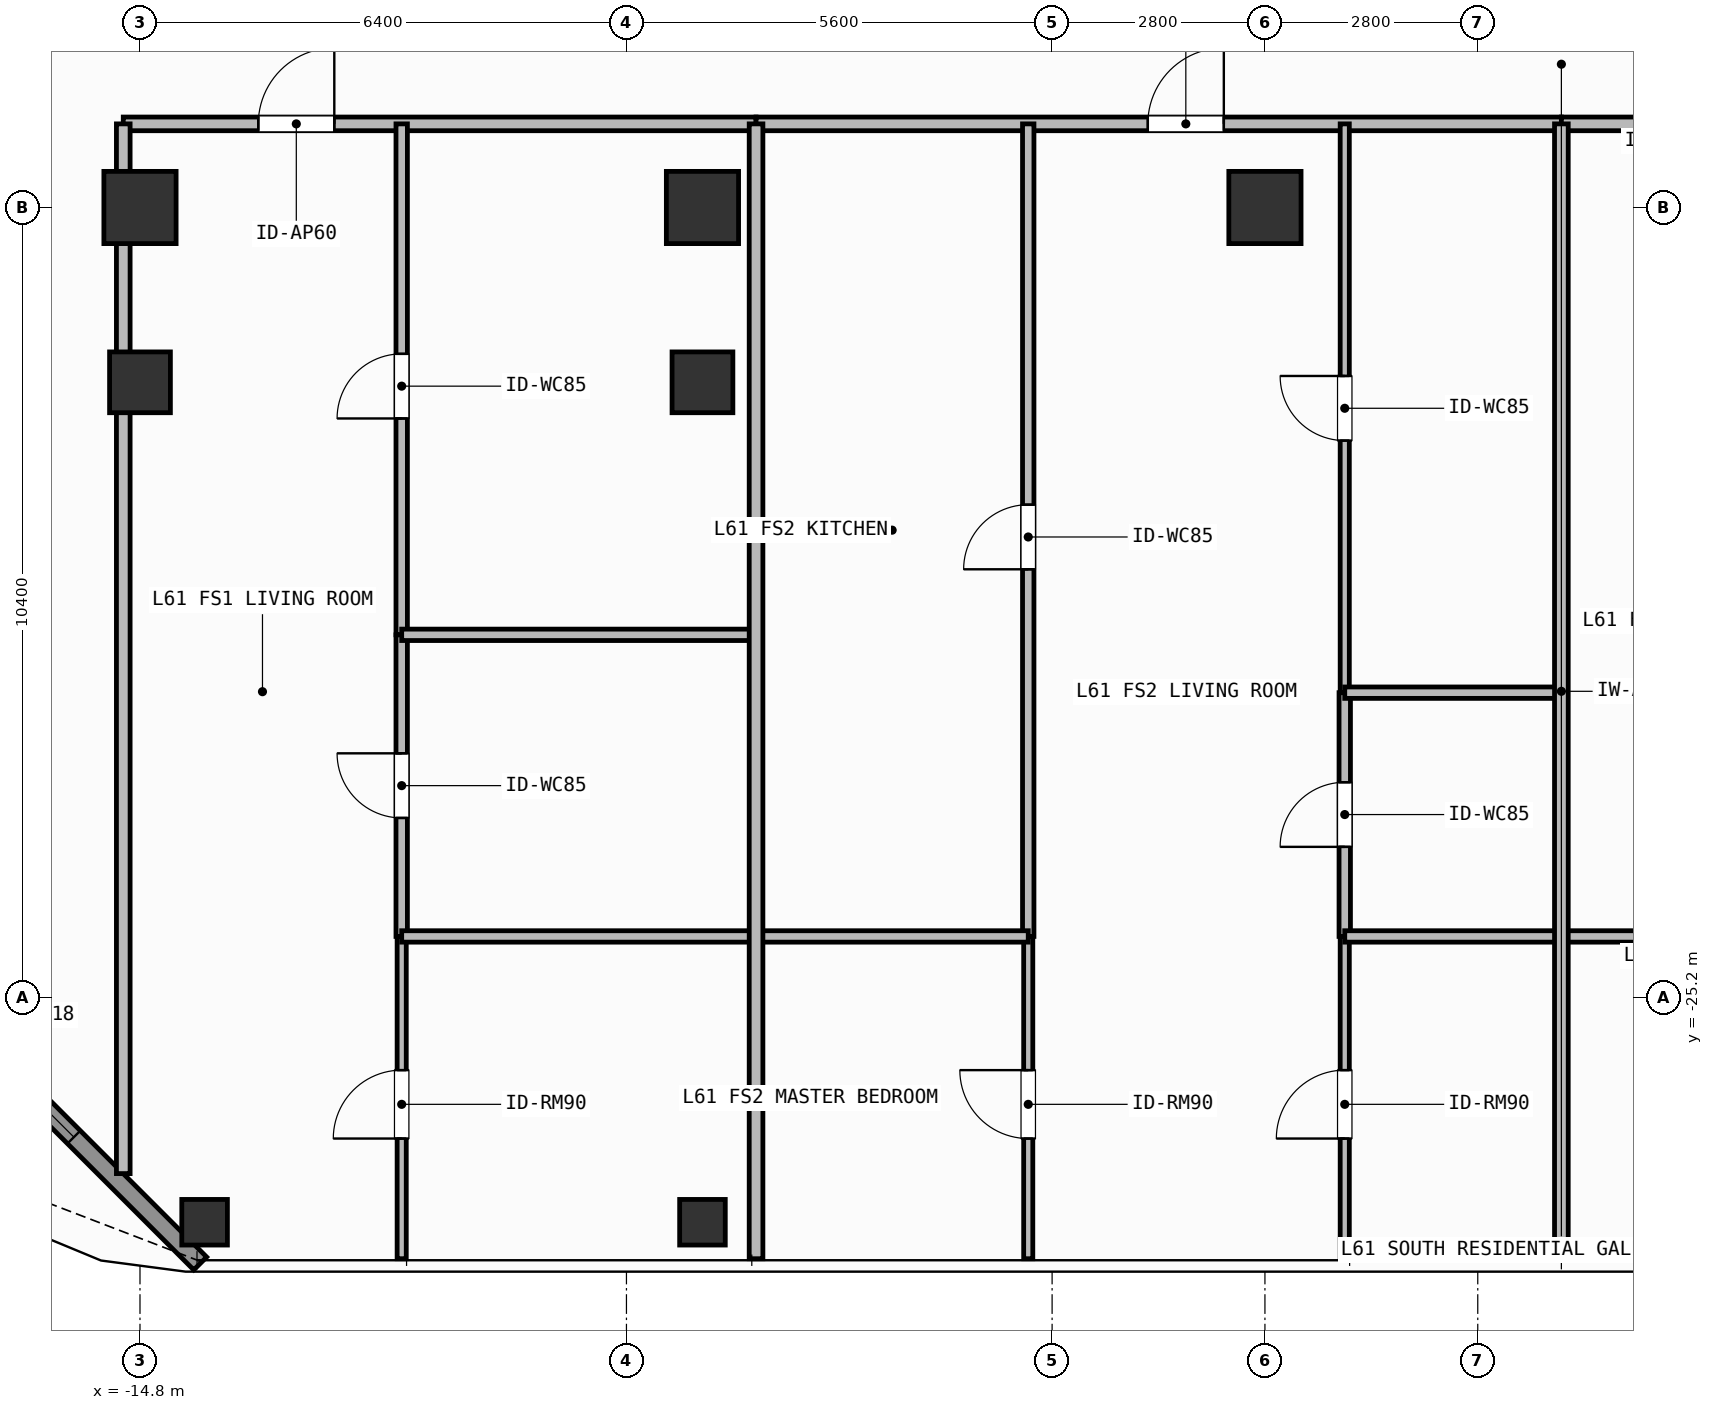
"""IFC4 building model, lengths in metres.
Left out: names, types, materials, properties, quantities, classifications, styles, units other than length and angle.
Written with IfcOpenShell. Run it as: python <this file> out.ifc"""

import sys

from ifc_helpers import new_model, si_unit, direction, frame, frame_2d, origin, origin_2d, place, context, subcontext, project, spatial, rectangle, hollow_rectangle, extrude, element, fill, save


model = new_model("IFC4")
c1 = context("Model", 3, precision=1e-05, world=origin(), true_north=direction((0.0, 1.0)))
c2 = subcontext(c1, "Body", "Model", "MODEL_VIEW")
j1 = project(units=[si_unit("LENGTHUNIT", "METRE"), si_unit("PLANEANGLEUNIT", "RADIAN")], contexts=[c1])
p1 = place(None, origin())
s1 = spatial("IfcSite", under=j1, at=p1, CompositionType="ELEMENT")
p2 = place(p1, origin())
s2 = spatial("IfcBuilding", under=s1, at=p2, CompositionType="ELEMENT")
p3 = place(p2, frame((0.0, 0.0, 250.8)))
s3 = spatial("IfcBuildingStorey", under=s2, at=p3, CompositionType="ELEMENT", Elevation=250.8)
for number, where, z_axis, x_axis in (
    (1, (-14.8, -14.8, 0.0), (0.0, 0.0, 1.0), (1.0, 0.0, 0.0)),
    (2, (-7.4, -14.8, 0.0), (0.0, 0.0, 1.0), (1.0, 0.0, 0.0)),
    (3, (0.0, -14.8, 0.0), (0.0, 0.0, 1.0), (1.0, 0.0, 0.0)),
):
    element("IfcColumn", number, at=place(p3, frame(where, z_axis=z_axis, x_axis=x_axis)), inside=s3, PredefinedType="COLUMN", context=c2, shape_type="SweptSolid", body=[
        extrude(rectangle(XDim=0.95, YDim=0.95, at=origin_2d()), origin(), (0.0, 0.0, 1.0), 3.9),
    ])
for number, where, z_axis, x_axis in (
    (4, (-14.8, -17.1, 0.0), (0.0, 0.0, 1.0), (1.0, 0.0, 0.0)),
    (5, (-7.4, -17.1, 0.0), (0.0, 0.0, 1.0), (1.0, 0.0, 0.0)),
):
    element("IfcColumn", number, at=place(p3, frame(where, z_axis=z_axis, x_axis=x_axis)), inside=s3, PredefinedType="COLUMN", context=c2, shape_type="SweptSolid", body=[
        extrude(hollow_rectangle(XDim=0.8, YDim=0.8, WallThickness=0.036, at=origin_2d()), origin(), (0.0, 0.0, 1.0), 3.9),
    ])
for number, where, z_axis, x_axis in (
    (6, (-13.95, -28.15, 0.0), (0.0, 0.0, 1.0), (1.0, 0.0, 0.0)),
    (7, (-7.4, -28.15, 0.0), (0.0, 0.0, 1.0), (1.0, 0.0, 0.0)),
):
    element("IfcColumn", number, at=place(p3, frame(where, z_axis=z_axis, x_axis=x_axis)), inside=s3, PredefinedType="COLUMN", context=c2, shape_type="SweptSolid", body=[
        extrude(hollow_rectangle(XDim=0.6, YDim=0.6, WallThickness=0.028, at=origin_2d()), origin(), (0.0, 0.0, 1.0), 3.9),
    ])
p4 = place(p3, frame((-14.008, -28.692, 0.0), z_axis=(0.0, 0.0, 1.0), x_axis=(-0.707106781187, 0.707106781187, 0.0)))
e8 = element("IfcWall", 8, at=p4, inside=s3, PredefinedType="SOLIDWALL", context=c2, shape_type="SweptSolid", body=[
    extrude(rectangle(XDim=6.201, YDim=0.24, at=frame_2d((3.101, 0.0))), origin(), (0.0, 0.0, 1.0), 3.62),
])
p5 = place(p4, frame((2.351, 0.0, 0.8)))
e9 = element("IfcOpeningElement", 9, at=p5, cuts=e8, PredefinedType="OPENING", context=c2, shape_type="SweptSolid", body=[
    extrude(rectangle(XDim=1.5, YDim=1.85, at=frame_2d((0.75, 0.925))), frame((0.0, 0.13, 0.0), z_axis=(0.0, -1.0, 0.0), x_axis=(1.0, 0.0, 0.0)), (0.0, 0.0, 1.0), 0.26),
])
p6 = place(p3, frame((-15.02, -13.7, 0.0), z_axis=(0.0, 0.0, 1.0), x_axis=(1.0, 0.0, 0.0)))
e10 = element("IfcWall", 10, at=p6, inside=s3, PredefinedType="PARTITIONING", context=c2, shape_type="SweptSolid", body=[
    extrude(rectangle(XDim=8.325, YDim=0.18, at=frame_2d((4.163, 0.0))), origin(), (0.0, 0.0, 1.0), 3.62),
])
p7 = place(p6, frame((1.777, 0.0, 0.0)))
e11 = element("IfcOpeningElement", 11, at=p7, cuts=e10, PredefinedType="OPENING", context=c2, shape_type="SweptSolid", body=[
    extrude(rectangle(XDim=1.0, YDim=2.2, at=frame_2d((0.5, 1.1))), frame((0.0, 0.1, 0.0), z_axis=(0.0, -1.0, 0.0), x_axis=(1.0, 0.0, 0.0)), (0.0, 0.0, 1.0), 0.2),
])
p8 = place(p3, frame((-11.357, -20.422, 0.0), z_axis=(0.0, 0.0, 1.0), x_axis=(0.0, 1.0, 0.0)))
e12 = element("IfcWall", 12, at=p8, inside=s3, PredefinedType="PARTITIONING", context=c2, shape_type="SweptSolid", body=[
    extrude(rectangle(XDim=6.722, YDim=0.15, at=frame_2d((3.361, 0.0))), origin(), (0.0, 0.0, 1.0), 3.62),
])
p9 = place(p8, frame((2.846, 0.0, 0.0)))
e13 = element("IfcOpeningElement", 13, at=p9, cuts=e12, PredefinedType="OPENING", context=c2, shape_type="SweptSolid", body=[
    extrude(rectangle(XDim=0.85, YDim=2.1, at=frame_2d((0.425, 1.05))), frame((0.0, 0.085, 0.0), z_axis=(0.0, -1.0, 0.0), x_axis=(1.0, 0.0, 0.0)), (0.0, 0.0, 1.0), 0.17),
])
p10 = place(p3, frame((-11.357, -24.39, 0.0), z_axis=(0.0, 0.0, 1.0), x_axis=(0.0, 1.0, 0.0)))
e14 = element("IfcWall", 14, at=p10, inside=s3, PredefinedType="PARTITIONING", context=c2, shape_type="SweptSolid", body=[
    extrude(rectangle(XDim=3.968, YDim=0.15, at=frame_2d((1.984, 0.0))), origin(), (0.0, 0.0, 1.0), 3.62),
])
p11 = place(p10, frame((1.559, 0.0, 0.0)))
e15 = element("IfcOpeningElement", 15, at=p11, cuts=e14, PredefinedType="OPENING", context=c2, shape_type="SweptSolid", body=[
    extrude(rectangle(XDim=0.85, YDim=2.1, at=frame_2d((0.425, 1.05))), frame((0.0, 0.085, 0.0), z_axis=(0.0, -1.0, 0.0), x_axis=(1.0, 0.0, 0.0)), (0.0, 0.0, 1.0), 0.17),
])
p12 = place(p3, frame((-11.357, -28.63, 0.0), z_axis=(0.0, 0.0, 1.0), x_axis=(0.0, 1.0, 0.0)))
e16 = element("IfcWall", 16, at=p12, inside=s3, PredefinedType="PARTITIONING", context=c2, shape_type="SweptSolid", body=[
    extrude(rectangle(XDim=4.24, YDim=0.12, at=frame_2d((2.12, 0.0))), origin(), (0.0, 0.0, 1.0), 3.62),
])
p13 = place(p12, frame((1.581, 0.0, 0.0)))
e17 = element("IfcOpeningElement", 17, at=p13, cuts=e16, PredefinedType="OPENING", context=c2, shape_type="SweptSolid", body=[
    extrude(rectangle(XDim=0.9, YDim=2.1, at=frame_2d((0.45, 1.05))), frame((0.0, 0.07, 0.0), z_axis=(0.0, -1.0, 0.0), x_axis=(1.0, 0.0, 0.0)), (0.0, 0.0, 1.0), 0.14),
])
p14 = place(p3, frame((-6.695, -13.7, 0.0), z_axis=(0.0, 0.0, 1.0), x_axis=(1.0, 0.0, 0.0)))
e18 = element("IfcWall", 18, at=p14, inside=s3, PredefinedType="PARTITIONING", context=c2, shape_type="SweptSolid", body=[
    extrude(rectangle(XDim=10.595, YDim=0.18, at=frame_2d((5.297, 0.0))), origin(), (0.0, 0.0, 1.0), 3.62),
])
p15 = place(p14, frame((5.154, 0.0, 0.0)))
e19 = element("IfcOpeningElement", 19, at=p15, cuts=e18, PredefinedType="OPENING", context=c2, shape_type="SweptSolid", body=[
    extrude(rectangle(XDim=1.0, YDim=2.2, at=frame_2d((0.5, 1.1))), frame((0.0, 0.1, 0.0), z_axis=(0.0, -1.0, 0.0), x_axis=(1.0, 0.0, 0.0)), (0.0, 0.0, 1.0), 0.2),
])
p16 = place(p3, frame((-3.114, -24.39, 0.0), z_axis=(0.0, 0.0, 1.0), x_axis=(0.0, 1.0, 0.0)))
e20 = element("IfcWall", 20, at=p16, inside=s3, PredefinedType="PARTITIONING", context=c2, shape_type="SweptSolid", body=[
    extrude(rectangle(XDim=10.69, YDim=0.15, at=frame_2d((5.345, 0.0))), origin(), (0.0, 0.0, 1.0), 3.62),
])
p17 = place(p16, frame((4.83, 0.0, 0.0)))
e21 = element("IfcOpeningElement", 21, at=p17, cuts=e20, PredefinedType="OPENING", context=c2, shape_type="SweptSolid", body=[
    extrude(rectangle(XDim=0.85, YDim=2.1, at=frame_2d((0.425, 1.05))), frame((0.0, 0.085, 0.0), z_axis=(0.0, -1.0, 0.0), x_axis=(1.0, 0.0, 0.0)), (0.0, 0.0, 1.0), 0.17),
])
p18 = place(p3, frame((-3.114, -28.63, 0.0), z_axis=(0.0, 0.0, 1.0), x_axis=(0.0, 1.0, 0.0)))
e22 = element("IfcWall", 22, at=p18, inside=s3, PredefinedType="PARTITIONING", context=c2, shape_type="SweptSolid", body=[
    extrude(rectangle(XDim=4.24, YDim=0.12, at=frame_2d((2.12, 0.0))), origin(), (0.0, 0.0, 1.0), 3.62),
])
p19 = place(p18, frame((1.581, 0.0, 0.0)))
e23 = element("IfcOpeningElement", 23, at=p19, cuts=e22, PredefinedType="OPENING", context=c2, shape_type="SweptSolid", body=[
    extrude(rectangle(XDim=0.9, YDim=2.1, at=frame_2d((0.45, 1.05))), frame((0.0, 0.07, 0.0), z_axis=(0.0, -1.0, 0.0), x_axis=(1.0, 0.0, 0.0)), (0.0, 0.0, 1.0), 0.14),
])
p20 = place(p3, frame((1.05, -24.39, 0.0), z_axis=(0.0, 0.0, 1.0), x_axis=(0.0, 1.0, 0.0)))
e24 = element("IfcWall", 24, at=p20, inside=s3, PredefinedType="PARTITIONING", context=c2, shape_type="SweptSolid", body=[
    extrude(rectangle(XDim=3.207, YDim=0.15, at=frame_2d((1.604, 0.0))), origin(), (0.0, 0.0, 1.0), 3.62),
])
p21 = place(p20, frame((1.178, 0.0, 0.0)))
e25 = element("IfcOpeningElement", 25, at=p21, cuts=e24, PredefinedType="OPENING", context=c2, shape_type="SweptSolid", body=[
    extrude(rectangle(XDim=0.85, YDim=2.1, at=frame_2d((0.425, 1.05))), frame((0.0, 0.085, 0.0), z_axis=(0.0, -1.0, 0.0), x_axis=(1.0, 0.0, 0.0)), (0.0, 0.0, 1.0), 0.17),
])
p22 = place(p3, frame((1.05, -21.183, 0.0), z_axis=(0.0, 0.0, 1.0), x_axis=(0.0, 1.0, 0.0)))
e26 = element("IfcWall", 26, at=p22, inside=s3, PredefinedType="PARTITIONING", context=c2, shape_type="SweptSolid", body=[
    extrude(rectangle(XDim=7.483, YDim=0.12, at=frame_2d((3.742, 0.0))), origin(), (0.0, 0.0, 1.0), 3.62),
])
p23 = place(p22, frame((3.316, 0.0, 0.0)))
e27 = element("IfcOpeningElement", 27, at=p23, cuts=e26, PredefinedType="OPENING", context=c2, shape_type="SweptSolid", body=[
    extrude(rectangle(XDim=0.85, YDim=2.1, at=frame_2d((0.425, 1.05))), frame((0.0, 0.07, 0.0), z_axis=(0.0, -1.0, 0.0), x_axis=(1.0, 0.0, 0.0)), (0.0, 0.0, 1.0), 0.14),
])
p24 = place(p3, frame((1.05, -28.63, 0.0), z_axis=(0.0, 0.0, 1.0), x_axis=(0.0, 1.0, 0.0)))
e28 = element("IfcWall", 28, at=p24, inside=s3, PredefinedType="PARTITIONING", context=c2, shape_type="SweptSolid", body=[
    extrude(rectangle(XDim=4.24, YDim=0.12, at=frame_2d((2.12, 0.0))), origin(), (0.0, 0.0, 1.0), 3.62),
])
p25 = place(p24, frame((1.581, 0.0, 0.0)))
e29 = element("IfcOpeningElement", 29, at=p25, cuts=e28, PredefinedType="OPENING", context=c2, shape_type="SweptSolid", body=[
    extrude(rectangle(XDim=0.9, YDim=2.1, at=frame_2d((0.45, 1.05))), frame((0.0, 0.07, 0.0), z_axis=(0.0, -1.0, 0.0), x_axis=(1.0, 0.0, 0.0)), (0.0, 0.0, 1.0), 0.14),
])
p26 = place(p3, frame((3.9, -13.7, 0.0), z_axis=(0.0, 0.0, 1.0), x_axis=(1.0, 0.0, 0.0)))
e30 = element("IfcWall", 30, at=p26, inside=s3, PredefinedType="PARTITIONING", context=c2, shape_type="SweptSolid", body=[
    extrude(rectangle(XDim=10.311, YDim=0.18, at=frame_2d((5.156, 0.0))), origin(), (0.0, 0.0, 1.0), 3.62),
])
p27 = place(p26, frame((4.296, 0.0, 0.0)))
e31 = element("IfcOpeningElement", 31, at=p27, cuts=e30, PredefinedType="OPENING", context=c2, shape_type="SweptSolid", body=[
    extrude(rectangle(XDim=1.0, YDim=2.2, at=frame_2d((0.5, 1.1))), frame((0.0, 0.1, 0.0), z_axis=(0.0, -1.0, 0.0), x_axis=(1.0, 0.0, 0.0)), (0.0, 0.0, 1.0), 0.2),
])
for number, where, z_axis, x_axis in (
    (32, (-11.357, -20.422, 0.0), (0.0, 0.0, 1.0), (1.0, 0.0, 0.0)),
    (33, (-11.357, -24.39, 0.0), (0.0, 0.0, 1.0), (1.0, 0.0, 0.0)),
):
    element("IfcWall", number, at=place(p3, frame(where, z_axis=z_axis, x_axis=x_axis)), inside=s3, PredefinedType="PARTITIONING", context=c2, shape_type="SweptSolid", body=[
        extrude(rectangle(XDim=4.662, YDim=0.15, at=frame_2d((2.331, 0.0))), origin(), (0.0, 0.0, 1.0), 3.62),
    ])
p28 = place(p3, frame((-6.695, -24.39, 0.0), z_axis=(0.0, 0.0, 1.0), x_axis=(1.0, 0.0, 0.0)))
e34 = element("IfcWall", 34, at=p28, inside=s3, PredefinedType="PARTITIONING", context=c2, shape_type="SweptSolid", body=[
    extrude(rectangle(XDim=3.581, YDim=0.15, at=frame_2d((1.791, 0.0))), origin(), (0.0, 0.0, 1.0), 3.62),
])
for number, where, z_axis, x_axis in (
    (35, (1.05, -21.183, 0.0), (0.0, 0.0, 1.0), (1.0, 0.0, 0.0)),
    (36, (1.05, -24.39, 0.0), (0.0, 0.0, 1.0), (1.0, 0.0, 0.0)),
):
    element("IfcWall", number, at=place(p3, frame(where, z_axis=z_axis, x_axis=x_axis)), inside=s3, PredefinedType="PARTITIONING", context=c2, shape_type="SweptSolid", body=[
        extrude(rectangle(XDim=2.85, YDim=0.15, at=frame_2d((1.425, 0.0))), origin(), (0.0, 0.0, 1.0), 3.62),
    ])
p29 = place(p3, frame((-6.695, -28.63, 0.0), z_axis=(0.0, 0.0, 1.0), x_axis=(0.0, 1.0, 0.0)))
e37 = element("IfcWall", 37, at=p29, inside=s3, PredefinedType="PARTITIONING", context=c2, shape_type="SweptSolid", body=[
    extrude(rectangle(XDim=14.93, YDim=0.18, at=frame_2d((7.465, 0.0))), origin(), (0.0, 0.0, 1.0), 3.62),
])
p30 = place(p3, frame((3.9, -24.39, 0.0), z_axis=(0.0, 0.0, 1.0), x_axis=(1.0, 0.0, 0.0)))
e38 = element("IfcWall", 38, at=p30, inside=s3, PredefinedType="PARTITIONING", context=c2, shape_type="SweptSolid", body=[
    extrude(rectangle(XDim=2.85, YDim=0.15, at=frame_2d((1.425, 0.0))), origin(), (0.0, 0.0, 1.0), 3.62),
])
p31 = place(p3, frame((3.9, -28.63, 0.0), z_axis=(0.0, 0.0, 1.0), x_axis=(0.0, 1.0, 0.0)))
e39 = element("IfcWall", 39, at=p31, inside=s3, PredefinedType="PARTITIONING", context=c2, shape_type="SweptSolid", body=[
    extrude(rectangle(XDim=14.93, YDim=0.18, at=frame_2d((7.465, 0.0))), origin(), (0.0, 0.0, 1.0), 3.62),
])
p32 = place(p3, frame((-15.02, -27.51, 0.0), z_axis=(0.0, 0.0, 1.0), x_axis=(0.0, 1.0, 0.0)))
e40 = element("IfcWall", 40, at=p32, inside=s3, PredefinedType="PARTITIONING", context=c2, shape_type="SweptSolid", body=[
    extrude(rectangle(XDim=13.81, YDim=0.18, at=frame_2d((6.905, 0.0))), origin(), (0.0, 0.0, 1.0), 3.62),
])
p33 = place(p5, origin())
e41 = element("IfcWindow", 41, at=p33, inside=s3, PartitioningType="SINGLE_PANEL", PredefinedType="WINDOW", context=c2, shape_type="SweptSolid", body=[
    extrude(rectangle(XDim=1.5, YDim=1.85, at=frame_2d((0.75, 0.925))), frame((0.0, 0.03, 0.0), z_axis=(0.0, -1.0, 0.0), x_axis=(1.0, 0.0, 0.0)), (0.0, 0.0, 1.0), 0.06),
])
fill(e9, e41)
p34 = place(p7, origin())
e42 = element("IfcDoor", 42, at=p34, inside=s3, OperationType="SINGLE_SWING_RIGHT", PredefinedType="DOOR", context=c2, shape_type="SweptSolid", body=[
    extrude(rectangle(XDim=1.0, YDim=2.2, at=frame_2d((0.5, 1.1))), frame((0.0, 0.025, 0.0), z_axis=(0.0, -1.0, 0.0), x_axis=(1.0, 0.0, 0.0)), (0.0, 0.0, 1.0), 0.05),
])
fill(e11, e42)
p35 = place(p9, origin())
e43 = element("IfcDoor", 43, at=p35, inside=s3, OperationType="SINGLE_SWING_LEFT", PredefinedType="DOOR", context=c2, shape_type="SweptSolid", body=[
    extrude(rectangle(XDim=0.85, YDim=2.1, at=frame_2d((0.425, 1.05))), frame((0.0, 0.025, 0.0), z_axis=(0.0, -1.0, 0.0), x_axis=(1.0, 0.0, 0.0)), (0.0, 0.0, 1.0), 0.05),
])
fill(e13, e43)
p36 = place(p11, origin())
e44 = element("IfcDoor", 44, at=p36, inside=s3, OperationType="SINGLE_SWING_RIGHT", PredefinedType="DOOR", context=c2, shape_type="SweptSolid", body=[
    extrude(rectangle(XDim=0.85, YDim=2.1, at=frame_2d((0.425, 1.05))), frame((0.0, 0.025, 0.0), z_axis=(0.0, -1.0, 0.0), x_axis=(1.0, 0.0, 0.0)), (0.0, 0.0, 1.0), 0.05),
])
fill(e15, e44)
p37 = place(p13, origin())
e45 = element("IfcDoor", 45, at=p37, inside=s3, OperationType="SINGLE_SWING_LEFT", PredefinedType="DOOR", context=c2, shape_type="SweptSolid", body=[
    extrude(rectangle(XDim=0.9, YDim=2.1, at=frame_2d((0.45, 1.05))), frame((0.0, 0.025, 0.0), z_axis=(0.0, -1.0, 0.0), x_axis=(1.0, 0.0, 0.0)), (0.0, 0.0, 1.0), 0.05),
])
fill(e17, e45)
p38 = place(p15, origin())
e46 = element("IfcDoor", 46, at=p38, inside=s3, OperationType="SINGLE_SWING_RIGHT", PredefinedType="DOOR", context=c2, shape_type="SweptSolid", body=[
    extrude(rectangle(XDim=1.0, YDim=2.2, at=frame_2d((0.5, 1.1))), frame((0.0, 0.025, 0.0), z_axis=(0.0, -1.0, 0.0), x_axis=(1.0, 0.0, 0.0)), (0.0, 0.0, 1.0), 0.05),
])
fill(e19, e46)
p39 = place(p17, origin())
e47 = element("IfcDoor", 47, at=p39, inside=s3, OperationType="SINGLE_SWING_LEFT", PredefinedType="DOOR", context=c2, shape_type="SweptSolid", body=[
    extrude(rectangle(XDim=0.85, YDim=2.1, at=frame_2d((0.425, 1.05))), frame((0.0, 0.025, 0.0), z_axis=(0.0, -1.0, 0.0), x_axis=(1.0, 0.0, 0.0)), (0.0, 0.0, 1.0), 0.05),
])
fill(e21, e47)
p40 = place(p19, origin())
e48 = element("IfcDoor", 48, at=p40, inside=s3, OperationType="SINGLE_SWING_RIGHT", PredefinedType="DOOR", context=c2, shape_type="SweptSolid", body=[
    extrude(rectangle(XDim=0.9, YDim=2.1, at=frame_2d((0.45, 1.05))), frame((0.0, 0.025, 0.0), z_axis=(0.0, -1.0, 0.0), x_axis=(1.0, 0.0, 0.0)), (0.0, 0.0, 1.0), 0.05),
])
fill(e23, e48)
p41 = place(p21, origin())
e49 = element("IfcDoor", 49, at=p41, inside=s3, OperationType="SINGLE_SWING_LEFT", PredefinedType="DOOR", context=c2, shape_type="SweptSolid", body=[
    extrude(rectangle(XDim=0.85, YDim=2.1, at=frame_2d((0.425, 1.05))), frame((0.0, 0.025, 0.0), z_axis=(0.0, -1.0, 0.0), x_axis=(1.0, 0.0, 0.0)), (0.0, 0.0, 1.0), 0.05),
])
fill(e25, e49)
p42 = place(p23, origin())
e50 = element("IfcDoor", 50, at=p42, inside=s3, OperationType="SINGLE_SWING_RIGHT", PredefinedType="DOOR", context=c2, shape_type="SweptSolid", body=[
    extrude(rectangle(XDim=0.85, YDim=2.1, at=frame_2d((0.425, 1.05))), frame((0.0, 0.025, 0.0), z_axis=(0.0, -1.0, 0.0), x_axis=(1.0, 0.0, 0.0)), (0.0, 0.0, 1.0), 0.05),
])
fill(e27, e50)
p43 = place(p25, origin())
e51 = element("IfcDoor", 51, at=p43, inside=s3, OperationType="SINGLE_SWING_LEFT", PredefinedType="DOOR", context=c2, shape_type="SweptSolid", body=[
    extrude(rectangle(XDim=0.9, YDim=2.1, at=frame_2d((0.45, 1.05))), frame((0.0, 0.025, 0.0), z_axis=(0.0, -1.0, 0.0), x_axis=(1.0, 0.0, 0.0)), (0.0, 0.0, 1.0), 0.05),
])
fill(e29, e51)
save(model, sys.argv[1])
